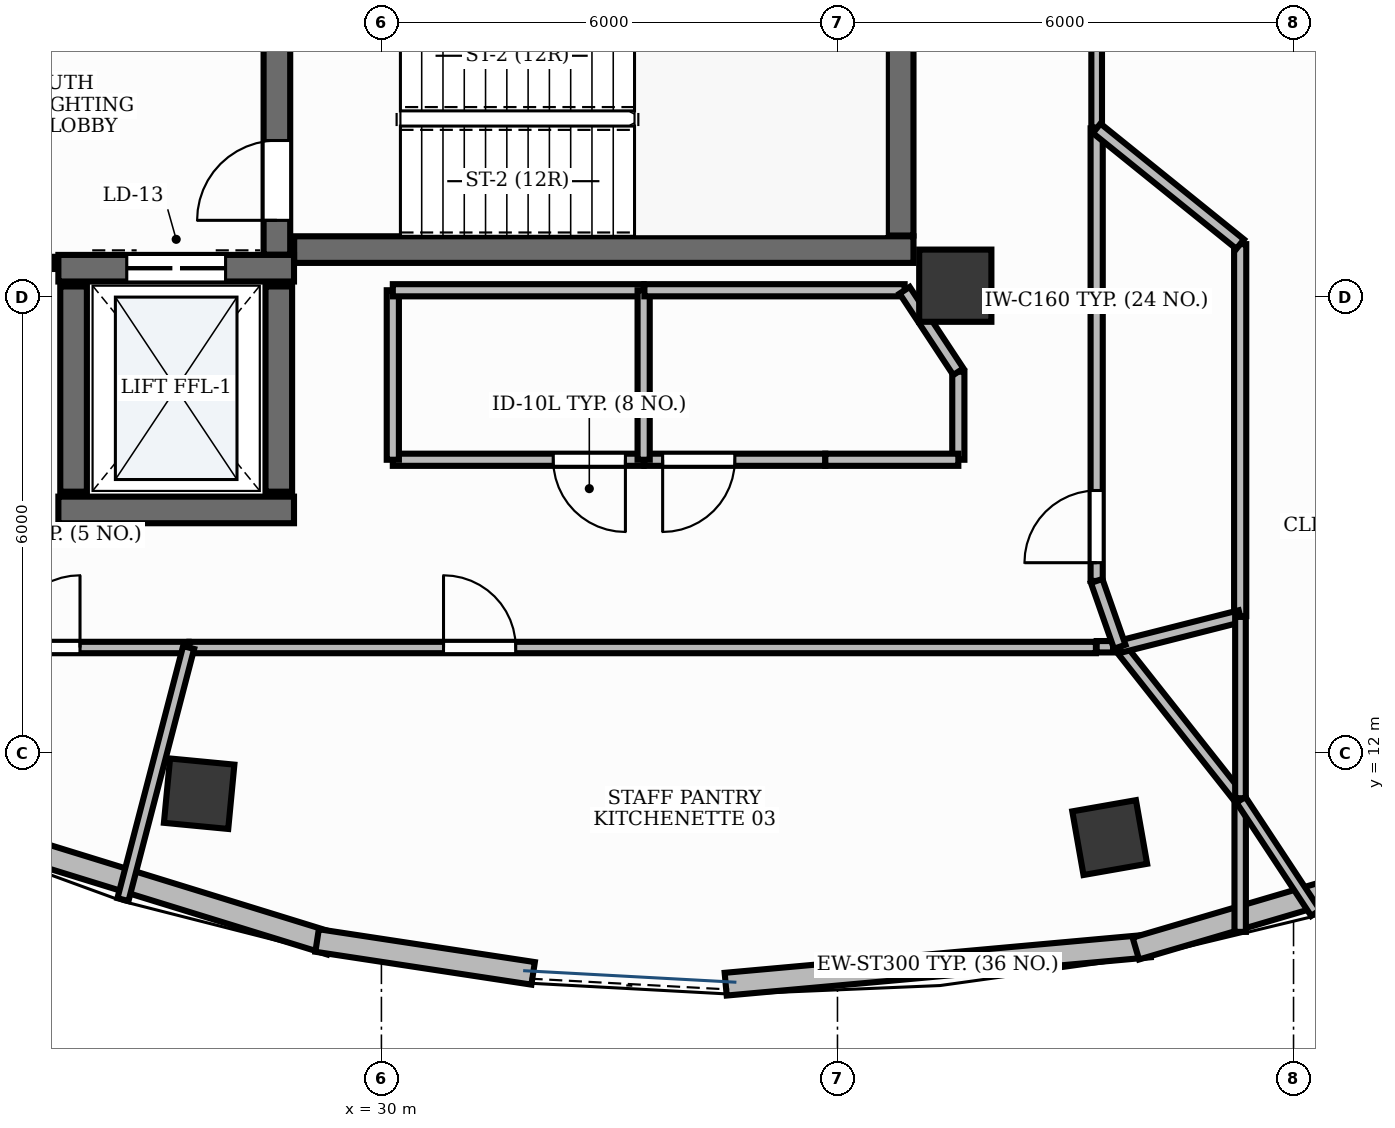
"""IFC4 building model, lengths in metres.
Left out: names, types, materials, properties, quantities, classifications, styles, units other than length and angle.
Written with IfcOpenShell. Run it as: python <this file> out.ifc"""

import sys

from ifc_helpers import new_model, si_unit, direction, frame, frame_2d, origin, origin_2d, place, context, subcontext, project, spatial, rectangle, extrude, element, fill, save


model = new_model("IFC4")
c1 = context("Model", 3, precision=1e-05, world=origin(), true_north=direction((0.0, 1.0)))
c2 = subcontext(c1, "Body", "Model", "MODEL_VIEW")
j1 = project(units=[si_unit("LENGTHUNIT", "METRE"), si_unit("PLANEANGLEUNIT", "RADIAN")], contexts=[c1])
p1 = place(None, origin())
s1 = spatial("IfcSite", under=j1, at=p1, CompositionType="ELEMENT")
p2 = place(p1, origin())
s2 = spatial("IfcBuilding", under=s1, at=p2, CompositionType="ELEMENT")
p3 = place(p2, frame((0.0, 0.0, 306.0)))
s3 = spatial("IfcBuildingStorey", under=s2, at=p3, CompositionType="ELEMENT", Elevation=306.0)
p4 = place(p3, frame((28.852, 18.625, 0.0), z_axis=(0.0, 0.0, 1.0), x_axis=(1.0, 0.0, 0.0)))
e1 = element("IfcWall", 1, at=p4, inside=s3, PredefinedType="SHEAR", context=c2, shape_type="SweptSolid", body=[
    extrude(rectangle(XDim=8.148, YDim=0.35, at=frame_2d((4.074, 0.0))), origin(), (0.0, 0.0, 1.0), 3.9),
])
p5 = place(p3, frame((36.825, 18.81, 0.0), z_axis=(0.0, 0.0, 1.0), x_axis=(0.0, 1.0, 0.0)))
e2 = element("IfcWall", 2, at=p5, inside=s3, PredefinedType="SHEAR", context=c2, shape_type="SweptSolid", body=[
    extrude(rectangle(XDim=3.08, YDim=0.35, at=frame_2d((1.54, 0.0))), origin(), (0.0, 0.0, 1.0), 3.9),
])
p6 = place(p3, frame((28.625, 18.557, 0.0), z_axis=(0.0, 0.0, 1.0), x_axis=(0.0, 1.0, 0.0)))
e3 = element("IfcWall", 3, at=p6, inside=s3, PredefinedType="SHEAR", context=c2, shape_type="SweptSolid", body=[
    extrude(rectangle(XDim=3.333, YDim=0.35, at=frame_2d((1.667, 0.0))), origin(), (0.0, 0.0, 1.0), 3.9),
])
p7 = place(p6, frame((0.453, 0.0, 0.0)))
e4 = element("IfcOpeningElement", 4, at=p7, cuts=e3, PredefinedType="OPENING", context=c2, shape_type="SweptSolid", body=[
    extrude(rectangle(XDim=1.05, YDim=2.15, at=frame_2d((0.525, 1.075))), frame((0.0, 0.19, 0.0), z_axis=(0.0, -1.0, 0.0), x_axis=(1.0, 0.0, 0.0)), (0.0, 0.0, 1.0), 0.38),
])
p8 = place(p3, frame((25.75, 15.2, 0.0), z_axis=(0.0, 0.0, 1.0), x_axis=(1.0, 0.0, 0.0)))
e5 = element("IfcWall", 5, at=p8, inside=s3, PredefinedType="SHEAR", context=c2, shape_type="SweptSolid", body=[
    extrude(rectangle(XDim=3.1, YDim=0.35, at=frame_2d((1.55, 0.0))), origin(), (0.0, 0.0, 1.0), 3.9),
])
p9 = place(p3, frame((25.75, 18.38, 0.0), z_axis=(0.0, 0.0, 1.0), x_axis=(1.0, 0.0, 0.0)))
e6 = element("IfcWall", 6, at=p9, inside=s3, PredefinedType="SHEAR", context=c2, shape_type="SweptSolid", body=[
    extrude(rectangle(XDim=3.1, YDim=0.35, at=frame_2d((1.55, 0.0))), origin(), (0.0, 0.0, 1.0), 3.9),
])
p10 = place(p9, frame((0.9, 0.0, 0.0)))
e7 = element("IfcOpeningElement", 7, at=p10, cuts=e6, PredefinedType="OPENING", context=c2, shape_type="SweptSolid", body=[
    extrude(rectangle(XDim=1.3, YDim=2.2, at=frame_2d((0.65, 1.1))), frame((0.0, 0.19, 0.0), z_axis=(0.0, -1.0, 0.0), x_axis=(1.0, 0.0, 0.0)), (0.0, 0.0, 1.0), 0.38),
])
for number, where, z_axis, x_axis in (
    (8, (25.95, 15.44, 0.0), (0.0, 0.0, 1.0), (0.0, 1.0, 0.0)),
    (9, (28.65, 15.44, 0.0), (0.0, 0.0, 1.0), (0.0, 1.0, 0.0)),
):
    element("IfcWall", number, at=place(p3, frame(where, z_axis=z_axis, x_axis=x_axis)), inside=s3, PredefinedType="SHEAR", context=c2, shape_type="SweptSolid", body=[
        extrude(rectangle(XDim=2.7, YDim=0.35, at=frame_2d((1.35, 0.0))), origin(), (0.0, 0.0, 1.0), 3.9),
    ])
p11 = place(p3, frame((37.55, 18.15, -0.0), z_axis=(0.0, 0.0, 1.0), x_axis=(1.0, 0.0, 0.0)))
e10 = element("IfcColumn", 10, at=p11, inside=s3, PredefinedType="PILASTER", context=c2, shape_type="SweptSolid", body=[
    extrude(rectangle(XDim=0.95, YDim=0.95, at=origin_2d()), origin(), (0.0, 0.0, 1.0), 3.901),
])
for number, where, z_axis, x_axis in (
    (11, (27.602, 11.466, -0.0), (0.0, 0.0, 1.0), (-0.995, 0.095, 0.0)),
    (12, (39.582, 10.889, -0.0), (0.0, 0.0, 1.0), (0.985, 0.173, 0.0)),
):
    element("IfcColumn", number, at=place(p3, frame(where, z_axis=z_axis, x_axis=x_axis)), inside=s3, PredefinedType="COLUMN", context=c2, shape_type="SweptSolid", body=[
        extrude(rectangle(XDim=0.85, YDim=0.85, at=origin_2d()), origin(), (0.0, 0.0, 1.0), 3.901),
    ])
p12 = place(p3, frame((24.088, 11.113, 0.0), z_axis=(0.0, 0.0, 1.0), x_axis=(0.955535200816, -0.29487705913, 0.0)))
e13 = element("IfcWall", 13, at=p12, inside=s3, PredefinedType="STANDARD", context=c2, shape_type="SweptSolid", body=[
    extrude(rectangle(XDim=5.485, YDim=0.3, at=frame_2d((2.743, 0.0))), origin(), (0.0, 0.0, 1.0), 3.9),
])
p13 = place(p3, frame((29.154, 9.535, 0.0), z_axis=(0.0, 0.0, 1.0), x_axis=(0.988626523862, -0.150391476873, 0.0)))
e14 = element("IfcWall", 14, at=p13, inside=s3, PredefinedType="STANDARD", context=c2, shape_type="SweptSolid", body=[
    extrude(rectangle(XDim=2.875, YDim=0.3, at=frame_2d((1.438, 0.0))), origin(), (0.0, 0.0, 1.0), 3.9),
])
p14 = place(p3, frame((34.529, 8.961, 0.0), z_axis=(0.0, 0.0, 1.0), x_axis=(0.995950163058, 0.089907022552, 0.0)))
e15 = element("IfcWall", 15, at=p14, inside=s3, PredefinedType="STANDARD", context=c2, shape_type="SweptSolid", body=[
    extrude(rectangle(XDim=5.602, YDim=0.3, at=frame_2d((2.801, 0.0))), origin(), (0.0, 0.0, 1.0), 3.9),
])
p15 = place(p3, frame((39.925, 9.429, 0.0), z_axis=(0.0, 0.0, 1.0), x_axis=(0.959276315934, 0.282469378321, 0.0)))
e16 = element("IfcWall", 16, at=p15, inside=s3, PredefinedType="STANDARD", context=c2, shape_type="SweptSolid", body=[
    extrude(rectangle(XDim=5.495, YDim=0.3, at=frame_2d((2.748, 0.0))), origin(), (0.0, 0.0, 1.0), 3.9),
])
p16 = place(p3, frame((23.58, 18.45, 0.0), z_axis=(0.0, 0.0, 1.0), x_axis=(1.0, 0.0, 0.0)))
e17 = element("IfcWall", 17, at=p16, inside=s3, PredefinedType="PARTITIONING", context=c2, shape_type="SweptSolid", body=[
    extrude(rectangle(XDim=2.12, YDim=0.16, at=frame_2d((1.06, 0.0))), origin(), (0.0, 0.0, 1.0), 2.91),
])
p17 = place(p3, frame((33.45, 15.86, 0.0), z_axis=(0.0, 0.0, 1.0), x_axis=(-1.0, 0.0, 0.0)))
e18 = element("IfcWall", 18, at=p17, inside=s3, PredefinedType="PARTITIONING", context=c2, shape_type="SweptSolid", body=[
    extrude(rectangle(XDim=3.3, YDim=0.16, at=frame_2d((1.65, 0.0))), origin(), (0.0, 0.0, 1.0), 2.91),
])
p18 = place(p17, frame((0.24, 0.0, 0.0)))
e19 = element("IfcOpeningElement", 19, at=p18, cuts=e18, PredefinedType="OPENING", context=c2, shape_type="SweptSolid", body=[
    extrude(rectangle(XDim=0.95, YDim=2.15, at=frame_2d((0.475, 1.075))), frame((0.0, 0.095, 0.0), z_axis=(0.0, -1.0, 0.0), x_axis=(1.0, 0.0, 0.0)), (0.0, 0.0, 1.0), 0.19),
])
p19 = place(p3, frame((24.381, 13.39, 0.0), z_axis=(0.0, 0.0, 1.0), x_axis=(1.0, 0.0, 0.0)))
e20 = element("IfcWall", 20, at=p19, inside=s3, PredefinedType="PARTITIONING", context=c2, shape_type="SweptSolid", body=[
    extrude(rectangle(XDim=3.083, YDim=0.15, at=frame_2d((1.542, 0.0))), origin(), (0.0, 0.0, 1.0), 2.91),
])
p20 = place(p19, frame((0.704, 0.0, 0.0)))
e21 = element("IfcOpeningElement", 21, at=p20, cuts=e20, PredefinedType="OPENING", context=c2, shape_type="SweptSolid", body=[
    extrude(rectangle(XDim=0.95, YDim=2.15, at=frame_2d((0.475, 1.075))), frame((0.0, 0.09, 0.0), z_axis=(0.0, -1.0, 0.0), x_axis=(1.0, 0.0, 0.0)), (0.0, 0.0, 1.0), 0.18),
])
p21 = place(p3, frame((27.474, 13.39, 0.0), z_axis=(0.0, 0.0, 1.0), x_axis=(1.0, 0.0, 0.0)))
e22 = element("IfcWall", 22, at=p21, inside=s3, PredefinedType="PARTITIONING", context=c2, shape_type="SweptSolid", body=[
    extrude(rectangle(XDim=11.926, YDim=0.15, at=frame_2d((5.963, 0.0))), origin(), (0.0, 0.0, 1.0), 2.91),
])
p22 = place(p21, frame((3.344, 0.0, 0.0)))
e23 = element("IfcOpeningElement", 23, at=p22, cuts=e22, PredefinedType="OPENING", context=c2, shape_type="SweptSolid", body=[
    extrude(rectangle(XDim=0.95, YDim=2.15, at=frame_2d((0.475, 1.075))), frame((0.0, 0.09, 0.0), z_axis=(0.0, -1.0, 0.0), x_axis=(1.0, 0.0, 0.0)), (0.0, 0.0, 1.0), 0.18),
])
p23 = place(p3, frame((35.84, 15.86, 0.0), z_axis=(0.0, 0.0, 1.0), x_axis=(-1.0, 0.0, 0.0)))
e24 = element("IfcWall", 24, at=p23, inside=s3, PredefinedType="PARTITIONING", context=c2, shape_type="SweptSolid", body=[
    extrude(rectangle(XDim=2.38, YDim=0.16, at=frame_2d((1.19, 0.0))), origin(), (0.0, 0.0, 1.0), 2.91),
])
p24 = place(p23, frame((1.19, 0.0, 0.0)))
e25 = element("IfcOpeningElement", 25, at=p24, cuts=e24, PredefinedType="OPENING", context=c2, shape_type="SweptSolid", body=[
    extrude(rectangle(XDim=0.95, YDim=2.15, at=frame_2d((0.475, 1.075))), frame((0.0, 0.095, 0.0), z_axis=(0.0, -1.0, 0.0), x_axis=(1.0, 0.0, 0.0)), (0.0, 0.0, 1.0), 0.19),
])
p25 = place(p3, frame((39.41, 14.266, 0.0), z_axis=(0.0, 0.0, 1.0), x_axis=(0.0, 1.0, 0.0)))
e26 = element("IfcWall", 26, at=p25, inside=s3, PredefinedType="PARTITIONING", context=c2, shape_type="SweptSolid", body=[
    extrude(rectangle(XDim=5.955, YDim=0.16, at=frame_2d((2.977, 0.0))), origin(), (0.0, 0.0, 1.0), 2.91),
])
p26 = place(p25, frame((0.24, 0.0, 0.0)))
e27 = element("IfcOpeningElement", 27, at=p26, cuts=e26, PredefinedType="OPENING", context=c2, shape_type="SweptSolid", body=[
    extrude(rectangle(XDim=0.95, YDim=2.15, at=frame_2d((0.475, 1.075))), frame((0.0, 0.095, 0.0), z_axis=(0.0, -1.0, 0.0), x_axis=(1.0, 0.0, 0.0)), (0.0, 0.0, 1.0), 0.19),
])
p27 = place(p3, frame((39.41, 20.23, 0.0), z_axis=(0.0, 0.0, 1.0), x_axis=(0.0, 1.0, 0.0)))
e28 = element("IfcWall", 28, at=p27, inside=s3, PredefinedType="PARTITIONING", context=c2, shape_type="SweptSolid", body=[
    extrude(rectangle(XDim=5.968, YDim=0.14, at=frame_2d((2.984, 0.0))), origin(), (0.0, 0.0, 1.0), 2.91),
])
p28 = place(p27, frame((1.08, 0.0, 0.0)))
e29 = element("IfcOpeningElement", 29, at=p28, cuts=e28, PredefinedType="OPENING", context=c2, shape_type="SweptSolid", body=[
    extrude(rectangle(XDim=0.95, YDim=2.15, at=frame_2d((0.475, 1.075))), frame((0.0, 0.085, 0.0), z_axis=(0.0, -1.0, 0.0), x_axis=(1.0, 0.0, 0.0)), (0.0, 0.0, 1.0), 0.17),
])
p29 = place(p3, frame((30.15, 15.86, 0.0), z_axis=(0.0, 0.0, 1.0), x_axis=(0.0, 1.0, 0.0)))
e30 = element("IfcWall", 30, at=p29, inside=s3, PredefinedType="PARTITIONING", context=c2, shape_type="SweptSolid", body=[
    extrude(rectangle(XDim=2.23, YDim=0.16, at=frame_2d((1.115, 0.0))), origin(), (0.0, 0.0, 1.0), 2.91),
])
p30 = place(p3, frame((30.15, 18.09, 0.0), z_axis=(0.0, 0.0, 1.0), x_axis=(1.0, 0.0, 0.0)))
e31 = element("IfcWall", 31, at=p30, inside=s3, PredefinedType="PARTITIONING", context=c2, shape_type="SweptSolid", body=[
    extrude(rectangle(XDim=3.3, YDim=0.16, at=frame_2d((1.65, 0.0))), origin(), (0.0, 0.0, 1.0), 2.91),
])
p31 = place(p3, frame((33.45, 18.09, 0.0), z_axis=(0.0, 0.0, 1.0), x_axis=(0.0, -1.0, 0.0)))
e32 = element("IfcWall", 32, at=p31, inside=s3, PredefinedType="PARTITIONING", context=c2, shape_type="SweptSolid", body=[
    extrude(rectangle(XDim=2.23, YDim=0.16, at=frame_2d((1.115, 0.0))), origin(), (0.0, 0.0, 1.0), 2.91),
])
p32 = place(p3, frame((27.464, 13.39, 0.0), z_axis=(0.0, 0.0, 1.0), x_axis=(-0.252111588714, -0.967698169284, 0.0)))
e33 = element("IfcWall", 33, at=p32, inside=s3, PredefinedType="PARTITIONING", context=c2, shape_type="SweptSolid", body=[
    extrude(rectangle(XDim=3.427, YDim=0.15, at=frame_2d((1.713, 0.0))), origin(), (0.0, 0.0, 1.0), 2.91),
])
p33 = place(p3, frame((39.713, 13.4, 0.0), z_axis=(0.0, 0.0, 1.0), x_axis=(0.620093383625, -0.784528008158, 0.0)))
e34 = element("IfcWall", 34, at=p33, inside=s3, PredefinedType="PARTITIONING", context=c2, shape_type="SweptSolid", body=[
    extrude(rectangle(XDim=2.555, YDim=0.15, at=frame_2d((1.278, 0.0))), origin(), (0.0, 0.0, 1.0), 2.91),
])
p34 = place(p3, frame((41.298, 11.395, 0.0), z_axis=(0.0, 0.0, 1.0), x_axis=(0.0, -1.0, 0.0)))
e35 = element("IfcWall", 35, at=p34, inside=s3, PredefinedType="PARTITIONING", context=c2, shape_type="SweptSolid", body=[
    extrude(rectangle(XDim=1.746, YDim=0.15, at=frame_2d((0.873, 0.0))), origin(), (0.0, 0.0, 1.0), 2.91),
])
p35 = place(p3, frame((39.41, 13.4, 0.0), z_axis=(0.0, 0.0, 1.0), x_axis=(1.0, 0.0, 0.0)))
e36 = element("IfcWall", 36, at=p35, inside=s3, PredefinedType="PARTITIONING", context=c2, shape_type="SweptSolid", body=[
    extrude(rectangle(XDim=0.216, YDim=0.15, at=frame_2d((0.108, 0.0))), origin(), (0.0, 0.0, 1.0), 2.91),
])
p36 = place(p3, frame((37.59, 17.019, 0.0), z_axis=(0.0, 0.0, 1.0), x_axis=(0.0, -1.0, 0.0)))
e37 = element("IfcWall", 37, at=p36, inside=s3, PredefinedType="PARTITIONING", context=c2, shape_type="SweptSolid", body=[
    extrude(rectangle(XDim=1.158, YDim=0.16, at=frame_2d((0.579, 0.0))), origin(), (0.0, 0.0, 1.0), 2.91),
])
p37 = place(p3, frame((37.59, 15.86, 0.0), z_axis=(0.0, 0.0, 1.0), x_axis=(-1.0, 0.0, 0.0)))
e38 = element("IfcWall", 38, at=p37, inside=s3, PredefinedType="PARTITIONING", context=c2, shape_type="SweptSolid", body=[
    extrude(rectangle(XDim=1.75, YDim=0.16, at=frame_2d((0.875, 0.0))), origin(), (0.0, 0.0, 1.0), 2.91),
])
p38 = place(p3, frame((33.46, 18.09, 0.0), z_axis=(0.0, 0.0, 1.0), x_axis=(1.0, 0.0, 0.0)))
e39 = element("IfcWall", 39, at=p38, inside=s3, PredefinedType="PARTITIONING", context=c2, shape_type="SweptSolid", body=[
    extrude(rectangle(XDim=3.424, YDim=0.16, at=frame_2d((1.712, 0.0))), origin(), (0.0, 0.0, 1.0), 2.91),
])
p39 = place(p3, frame((36.884, 18.09, 0.0), z_axis=(0.0, 0.0, 1.0), x_axis=(0.550479112078, -0.834848936734, 0.0)))
e40 = element("IfcWall", 40, at=p39, inside=s3, PredefinedType="PARTITIONING", context=c2, shape_type="SweptSolid", body=[
    extrude(rectangle(XDim=1.283, YDim=0.16, at=frame_2d((0.642, 0.0))), origin(), (0.0, 0.0, 1.0), 2.91),
])
p40 = place(p3, frame((41.298, 18.697, 0.0), z_axis=(0.0, 0.0, 1.0), x_axis=(0.0, -1.0, 0.0)))
e41 = element("IfcWall", 41, at=p40, inside=s3, PredefinedType="PARTITIONING", context=c2, shape_type="SweptSolid", body=[
    extrude(rectangle(XDim=4.895, YDim=0.16, at=frame_2d((2.447, 0.0))), origin(), (0.0, 0.0, 1.0), 2.91),
])
p41 = place(p3, frame((41.298, 13.802, 0.0), z_axis=(0.0, 0.0, 1.0), x_axis=(-0.969284468685, -0.245942307799, 0.0)))
e42 = element("IfcWall", 42, at=p41, inside=s3, PredefinedType="PARTITIONING", context=c2, shape_type="SweptSolid", body=[
    extrude(rectangle(XDim=1.635, YDim=0.16, at=frame_2d((0.817, 0.0))), origin(), (0.0, 0.0, 1.0), 2.91),
])
p42 = place(p3, frame((39.713, 13.4, 0.0), z_axis=(0.0, 0.0, 1.0), x_axis=(-0.330800853859, 0.943700585507, 0.0)))
e43 = element("IfcWall", 43, at=p42, inside=s3, PredefinedType="PARTITIONING", context=c2, shape_type="SweptSolid", body=[
    extrude(rectangle(XDim=0.917, YDim=0.16, at=frame_2d((0.459, 0.0))), origin(), (0.0, 0.0, 1.0), 2.91),
])
p43 = place(p3, frame((39.41, 20.22, 0.0), z_axis=(0.0, 0.0, 1.0), x_axis=(0.778270259655, -0.627929456975, 0.0)))
e44 = element("IfcWall", 44, at=p43, inside=s3, PredefinedType="PARTITIONING", context=c2, shape_type="SweptSolid", body=[
    extrude(rectangle(XDim=2.426, YDim=0.16, at=frame_2d((1.213, 0.0))), origin(), (0.0, 0.0, 1.0), 2.91),
])
p44 = place(p3, frame((42.291, 9.897, 0.0), z_axis=(0.0, 0.0, 1.0), x_axis=(-0.550495379436, 0.834838210206, 0.0)))
e45 = element("IfcWall", 45, at=p44, inside=s3, PredefinedType="PARTITIONING", context=c2, shape_type="SweptSolid", body=[
    extrude(rectangle(XDim=1.785, YDim=0.14, at=frame_2d((0.893, 0.0))), origin(), (0.0, 0.0, 1.0), 2.91),
])
p45 = place(p3, frame((41.302, 11.407, 0.0), z_axis=(0.0, 0.0, 1.0), x_axis=(0.0, 1.0, 0.0)))
e46 = element("IfcWall", 46, at=p45, inside=s3, PredefinedType="PARTITIONING", context=c2, shape_type="SweptSolid", body=[
    extrude(rectangle(XDim=2.385, YDim=0.14, at=frame_2d((1.193, 0.0))), origin(), (0.0, 0.0, 1.0), 2.91),
])
p46 = place(p7, origin())
e47 = element("IfcDoor", 47, at=p46, inside=s3, OperationType="SINGLE_SWING_LEFT", PredefinedType="DOOR", context=c2, shape_type="SweptSolid", body=[
    extrude(rectangle(XDim=1.05, YDim=2.15, at=frame_2d((0.525, 1.075))), frame((0.0, 0.025, 0.0), z_axis=(0.0, -1.0, 0.0), x_axis=(1.0, 0.0, 0.0)), (0.0, 0.0, 1.0), 0.05),
])
fill(e4, e47)
p47 = place(p10, origin())
e48 = element("IfcDoor", 48, at=p47, inside=s3, OperationType="DOUBLE_DOOR_SLIDING", PredefinedType="DOOR", context=c2, shape_type="SweptSolid", body=[
    extrude(rectangle(XDim=1.3, YDim=2.2, at=frame_2d((0.65, 1.1))), frame((0.0, 0.025, 0.0), z_axis=(0.0, -1.0, 0.0), x_axis=(1.0, 0.0, 0.0)), (0.0, 0.0, 1.0), 0.05),
])
fill(e7, e48)
p48 = place(p18, origin())
e49 = element("IfcDoor", 49, at=p48, inside=s3, OperationType="SINGLE_SWING_LEFT", PredefinedType="DOOR", context=c2, shape_type="SweptSolid", body=[
    extrude(rectangle(XDim=0.95, YDim=2.15, at=frame_2d((0.475, 1.075))), frame((0.0, 0.025, 0.0), z_axis=(0.0, -1.0, 0.0), x_axis=(1.0, 0.0, 0.0)), (0.0, 0.0, 1.0), 0.05),
])
fill(e19, e49)
p49 = place(p20, origin())
e50 = element("IfcDoor", 50, at=p49, inside=s3, OperationType="SINGLE_SWING_RIGHT", PredefinedType="DOOR", context=c2, shape_type="SweptSolid", body=[
    extrude(rectangle(XDim=0.95, YDim=2.15, at=frame_2d((0.475, 1.075))), frame((0.0, 0.025, 0.0), z_axis=(0.0, -1.0, 0.0), x_axis=(1.0, 0.0, 0.0)), (0.0, 0.0, 1.0), 0.05),
])
fill(e21, e50)
p50 = place(p22, origin())
e51 = element("IfcDoor", 51, at=p50, inside=s3, OperationType="SINGLE_SWING_LEFT", PredefinedType="DOOR", context=c2, shape_type="SweptSolid", body=[
    extrude(rectangle(XDim=0.95, YDim=2.15, at=frame_2d((0.475, 1.075))), frame((0.0, 0.025, 0.0), z_axis=(0.0, -1.0, 0.0), x_axis=(1.0, 0.0, 0.0)), (0.0, 0.0, 1.0), 0.05),
])
fill(e23, e51)
p51 = place(p24, origin())
e52 = element("IfcDoor", 52, at=p51, inside=s3, OperationType="SINGLE_SWING_RIGHT", PredefinedType="DOOR", context=c2, shape_type="SweptSolid", body=[
    extrude(rectangle(XDim=0.95, YDim=2.15, at=frame_2d((0.475, 1.075))), frame((0.0, 0.025, 0.0), z_axis=(0.0, -1.0, 0.0), x_axis=(1.0, 0.0, 0.0)), (0.0, 0.0, 1.0), 0.05),
])
fill(e25, e52)
p52 = place(p26, origin())
e53 = element("IfcDoor", 53, at=p52, inside=s3, OperationType="SINGLE_SWING_LEFT", PredefinedType="DOOR", context=c2, shape_type="SweptSolid", body=[
    extrude(rectangle(XDim=0.95, YDim=2.15, at=frame_2d((0.475, 1.075))), frame((0.0, 0.025, 0.0), z_axis=(0.0, -1.0, 0.0), x_axis=(1.0, 0.0, 0.0)), (0.0, 0.0, 1.0), 0.05),
])
fill(e27, e53)
save(model, sys.argv[1])
